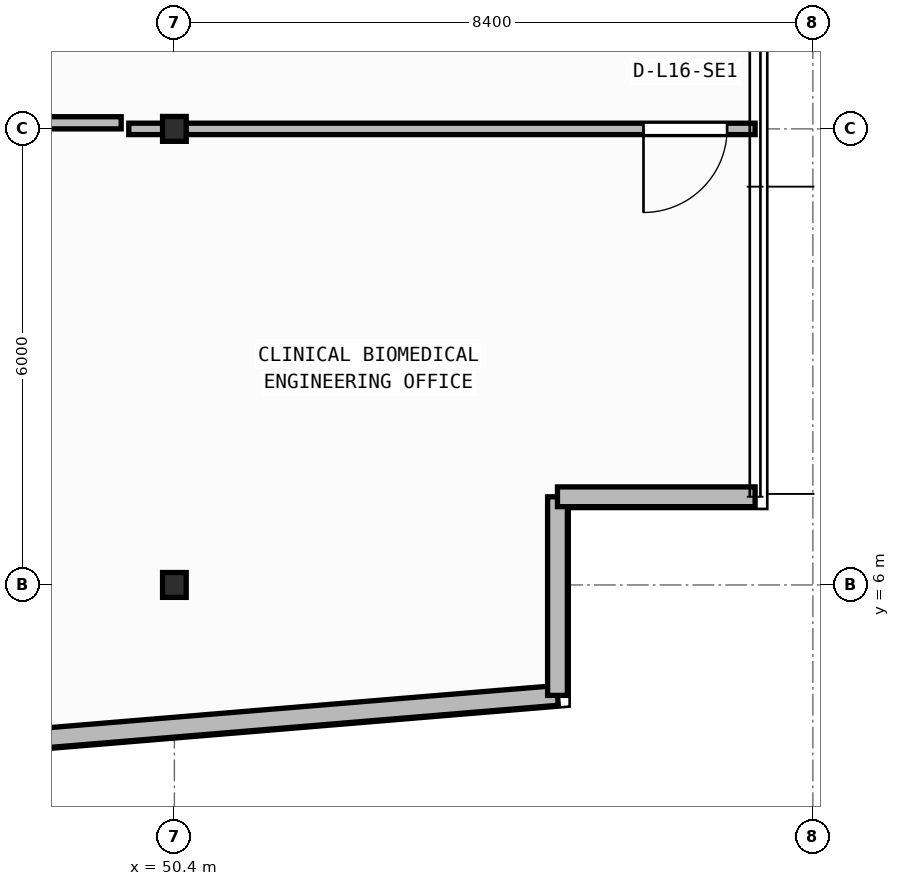
"""IFC4 building model, lengths in metres.
Left out: names, types, materials, properties, quantities, classifications, styles, units other than length and angle.
Written with IfcOpenShell. Run it as: python <this file> out.ifc"""

import sys

from ifc_helpers import new_model, si_unit, direction, frame, frame_2d, origin, origin_2d, place, context, subcontext, project, spatial, rectangle, i_section, extrude, element, fill, save


model = new_model("IFC4")
c1 = context("Model", 3, precision=1e-05, world=origin(), true_north=direction((0.0, 1.0)))
c2 = subcontext(c1, "Body", "Model", "MODEL_VIEW")
j1 = project(units=[si_unit("LENGTHUNIT", "METRE"), si_unit("PLANEANGLEUNIT", "RADIAN")], contexts=[c1])
p1 = place(None, origin())
s1 = spatial("IfcSite", under=j1, at=p1, CompositionType="ELEMENT")
p2 = place(p1, origin())
s2 = spatial("IfcBuilding", under=s1, at=p2, CompositionType="ELEMENT")
p3 = place(p2, frame((0.0, 0.0, 65.95)))
s3 = spatial("IfcBuildingStorey", under=s2, at=p3, CompositionType="ELEMENT", Elevation=65.95)
for number, where, z_axis, x_axis in (
    (1, (50.4, 6.0, 0.0), (0.0, 0.0, 1.0), (1.0, 0.0, 0.0)),
    (2, (50.4, 12.0, 0.0), (0.0, 0.0, 1.0), (1.0, 0.0, 0.0)),
):
    element("IfcColumn", number, at=place(p3, frame(where, z_axis=z_axis, x_axis=x_axis)), inside=s3, PredefinedType="COLUMN", context=c2, shape_type="SweptSolid", body=[
        extrude(i_section(OverallWidth=0.311, OverallDepth=0.327, WebThickness=0.016, FlangeThickness=0.025, FilletRadius=0.017, at=origin_2d()), origin(), (0.0, 0.0, 1.0), 3.95),
    ])
p4 = place(p3, frame((2.76, 0.174, 0.0), z_axis=(0.0, 0.0, 1.0), x_axis=(0.996571478456, 0.082736257641, 0.0)))
e3 = element("IfcWall", 3, at=p4, inside=s3, PredefinedType="STANDARD", context=c2, shape_type="SweptSolid", body=[
    extrude(rectangle(XDim=52.861, YDim=0.26, at=frame_2d((26.431, 0.0))), origin(), (0.0, 0.0, 1.0), 3.71),
])
p5 = place(p4, frame((25.231, 0.0, 0.9)))
e4 = element("IfcOpeningElement", 4, at=p5, cuts=e3, PredefinedType="OPENING", context=c2, shape_type="SweptSolid", body=[
    extrude(rectangle(XDim=2.4, YDim=1.65, at=frame_2d((1.2, 0.825))), frame((0.0, 0.14, 0.0), z_axis=(0.0, -1.0, 0.0), x_axis=(1.0, 0.0, 0.0)), (0.0, 0.0, 1.0), 0.28),
])
p6 = place(p3, frame((55.44, 4.547, 0.0), z_axis=(0.0, 0.0, 1.0), x_axis=(0.0, 1.0, 0.0)))
e5 = element("IfcWall", 5, at=p6, inside=s3, PredefinedType="STANDARD", context=c2, shape_type="SweptSolid", body=[
    extrude(rectangle(XDim=2.613, YDim=0.26, at=frame_2d((1.306, 0.0))), origin(), (0.0, 0.0, 1.0), 3.71),
])
p7 = place(p3, frame((55.44, 7.16, 0.0), z_axis=(0.0, 0.0, 1.0), x_axis=(1.0, 0.0, 0.0)))
e6 = element("IfcWall", 6, at=p7, inside=s3, PredefinedType="STANDARD", context=c2, shape_type="SweptSolid", body=[
    extrude(rectangle(XDim=2.6, YDim=0.26, at=frame_2d((1.3, 0.0))), origin(), (0.0, 0.0, 1.0), 3.71),
])
p8 = place(p3, frame((58.04, 12.0, 0.0), z_axis=(0.0, 0.0, 1.0), x_axis=(-1.0, 0.0, 0.0)))
e7 = element("IfcWall", 7, at=p8, inside=s3, PredefinedType="PARTITIONING", context=c2, shape_type="SweptSolid", body=[
    extrude(rectangle(XDim=8.24, YDim=0.15, at=frame_2d((4.12, 0.0))), origin(), (0.0, 0.0, 1.0), 3.073),
])
p9 = place(p8, frame((0.368, 0.0, 0.0)))
e8 = element("IfcOpeningElement", 8, at=p9, cuts=e7, PredefinedType="OPENING", context=c2, shape_type="SweptSolid", body=[
    extrude(rectangle(XDim=1.1, YDim=2.1, at=frame_2d((0.55, 1.05))), frame((0.0, 0.085, 0.0), z_axis=(0.0, -1.0, 0.0), x_axis=(1.0, 0.0, 0.0)), (0.0, 0.0, 1.0), 0.17),
])
p10 = place(p3, frame((46.689, 12.08, 0.0), z_axis=(0.0, 0.0, 1.0), x_axis=(1.0, 0.0, 0.0)))
e9 = element("IfcWall", 9, at=p10, inside=s3, PredefinedType="PARTITIONING", context=c2, shape_type="SweptSolid", body=[
    extrude(rectangle(XDim=3.011, YDim=0.16, at=frame_2d((1.505, 0.0))), origin(), (0.0, 0.0, 1.0), 3.073),
])
p11 = place(p9, origin())
e10 = element("IfcDoor", 10, at=p11, inside=s3, OperationType="SINGLE_SWING_RIGHT", PredefinedType="DOOR", context=c2, shape_type="SweptSolid", body=[
    extrude(rectangle(XDim=1.1, YDim=2.1, at=frame_2d((0.55, 1.05))), frame((0.0, 0.025, 0.0), z_axis=(0.0, -1.0, 0.0), x_axis=(1.0, 0.0, 0.0)), (0.0, 0.0, 1.0), 0.05),
])
fill(e8, e10)
save(model, sys.argv[1])
